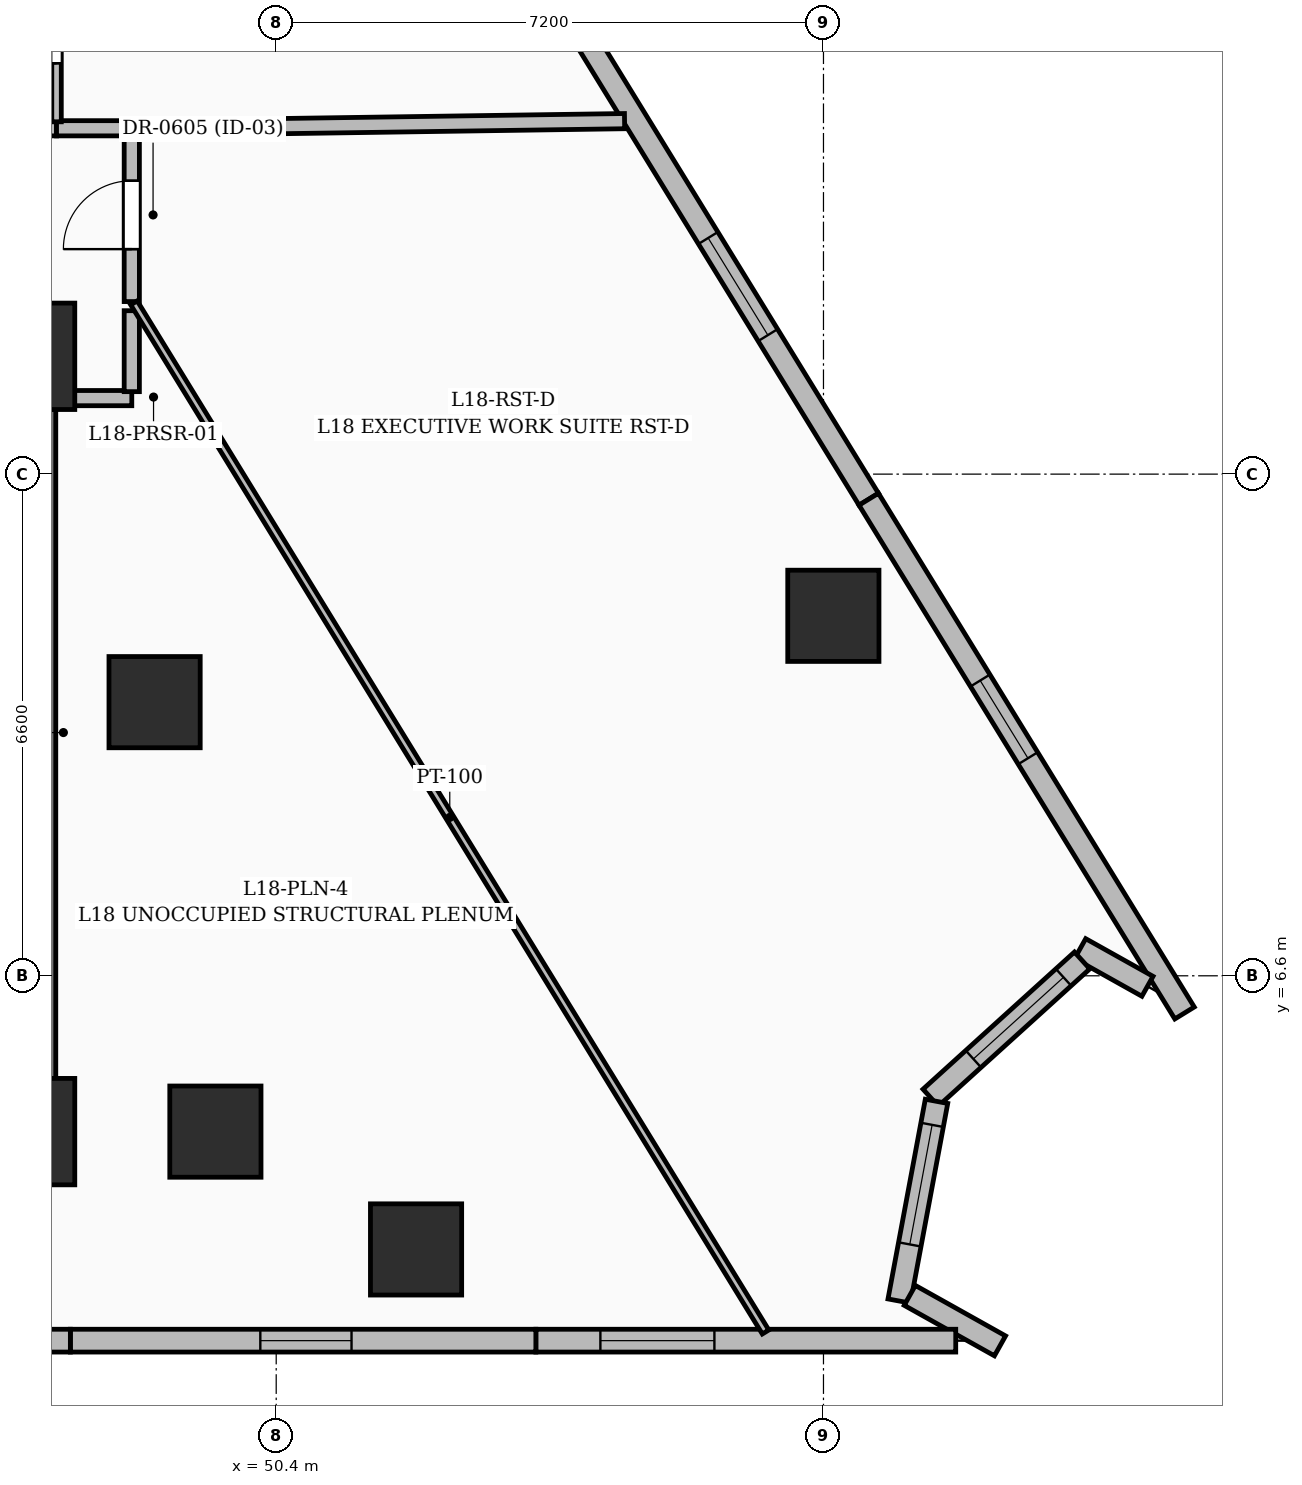
"""IFC4 building model, lengths in metres.
Left out: names, types, materials, properties, quantities, classifications, styles, units other than length and angle.
Written with IfcOpenShell. Run it as: python <this file> out.ifc"""

import sys

from ifc_helpers import new_model, si_unit, direction, frame, frame_2d, origin, origin_2d, place, context, subcontext, project, spatial, rectangle, extrude, element, fill, save


model = new_model("IFC4")
c1 = context("Model", 3, precision=1e-05, world=origin(), true_north=direction((0.0, 1.0)))
c2 = subcontext(c1, "Body", "Model", "MODEL_VIEW")
j1 = project(units=[si_unit("LENGTHUNIT", "METRE"), si_unit("PLANEANGLEUNIT", "RADIAN")], contexts=[c1])
p1 = place(None, origin())
s1 = spatial("IfcSite", under=j1, at=p1, CompositionType="ELEMENT")
p2 = place(p1, origin())
s2 = spatial("IfcBuilding", under=s1, at=p2, CompositionType="ELEMENT")
p3 = place(p2, frame((0.0, 0.0, 75.0)))
s3 = spatial("IfcBuildingStorey", under=s2, at=p3, CompositionType="ELEMENT", Elevation=75.0)
for number, where, z_axis, x_axis in (
    (1, (47.05, 4.55, 0.0), (0.0, 0.0, 1.0), (1.0, 0.0, 0.0)),
    (2, (47.05, 14.75, 0.0), (0.0, 0.0, 1.0), (1.0, 0.0, 0.0)),
):
    element("IfcColumn", number, at=place(p3, frame(where, z_axis=z_axis, x_axis=x_axis)), inside=s3, PredefinedType="COLUMN", context=c2, shape_type="SweptSolid", body=[
        extrude(rectangle(XDim=1.4, YDim=1.4, at=origin_2d()), origin(), (0.0, 0.0, 1.0), 3.6),
    ])
for number, where, z_axis, x_axis in (
    (3, (49.6, 4.55, 0.0), (0.0, 0.0, 1.0), (1.0, 0.0, 0.0)),
    (4, (48.8, 10.2, 0.0), (0.0, 0.0, 1.0), (1.0, 0.0, 0.0)),
):
    element("IfcColumn", number, at=place(p3, frame(where, z_axis=z_axis, x_axis=x_axis)), inside=s3, PredefinedType="COLUMN", context=c2, shape_type="SweptSolid", body=[
        extrude(rectangle(XDim=1.2, YDim=1.2, at=origin_2d()), origin(), (0.0, 0.0, 1.0), 3.6),
    ])
p4 = place(p3, frame((47.05, 5.25, 0.0), z_axis=(0.0, 0.0, 1.0), x_axis=(0.0, 1.0, 0.0)))
e5 = element("IfcWall", 5, at=p4, inside=s3, PredefinedType="SHEAR", context=c2, shape_type="SweptSolid", body=[
    extrude(rectangle(XDim=8.8, YDim=0.9, at=frame_2d((4.4, 0.0))), origin(), (0.0, 0.0, 1.0), 3.6),
])
for number, where, z_axis, x_axis in (
    (6, (52.24, 3.0, 0.0), (0.0, 0.0, 1.0), (1.0, 0.0, 0.0)),
    (7, (57.73, 11.336, 0.0), (0.0, 0.0, 1.0), (1.0, 0.0, 0.0)),
):
    element("IfcColumn", number, at=place(p3, frame(where, z_axis=z_axis, x_axis=x_axis)), inside=s3, PredefinedType="COLUMN", context=c2, shape_type="SweptSolid", body=[
        extrude(rectangle(XDim=1.2, YDim=1.2, at=origin_2d()), origin(), (0.0, 0.0, 1.0), 3.6),
    ])
p5 = place(p3, frame((54.041, 19.629, 0.0), z_axis=(0.0, 0.0, 1.0), x_axis=(0.523661280051, -0.851926560083, 0.0)))
e8 = element("IfcWall", 8, at=p5, inside=s3, PredefinedType="SOLIDWALL", context=c2, shape_type="SweptSolid", body=[
    extrude(rectangle(XDim=7.934, YDim=0.3, at=frame_2d((3.967, 0.0))), origin(), (0.0, 0.0, 1.0), 3.35),
])
p6 = place(p5, frame((3.9, 0.0, 0.6)))
e9 = element("IfcOpeningElement", 9, at=p6, cuts=e8, PredefinedType="OPENING", context=c2, shape_type="SweptSolid", body=[
    extrude(rectangle(XDim=1.5, YDim=2.1, at=frame_2d((0.75, 1.05))), frame((0.0, 0.16, 0.0), z_axis=(0.0, -1.0, 0.0), x_axis=(1.0, 0.0, 0.0)), (0.0, 0.0, 1.0), 0.32),
])
p7 = place(p3, frame((58.195, 12.87, 0.0), z_axis=(0.0, 0.0, 1.0), x_axis=(0.52368361247, -0.851912832413, 0.0)))
e10 = element("IfcWall", 10, at=p7, inside=s3, PredefinedType="SOLIDWALL", context=c2, shape_type="SweptSolid", body=[
    extrude(rectangle(XDim=7.934, YDim=0.3, at=frame_2d((3.967, 0.0))), origin(), (0.0, 0.0, 1.0), 3.35),
])
p8 = place(p7, frame((2.8, 0.0, 0.8)))
e11 = element("IfcOpeningElement", 11, at=p8, cuts=e10, PredefinedType="OPENING", context=c2, shape_type="SweptSolid", body=[
    extrude(rectangle(XDim=1.2, YDim=1.8, at=frame_2d((0.6, 0.9))), frame((0.0, 0.16, 0.0), z_axis=(0.0, -1.0, 0.0), x_axis=(1.0, 0.0, 0.0)), (0.0, 0.0, 1.0), 0.32),
])
p9 = place(p3, frame((61.863, 6.462, 0.0), z_axis=(0.0, 0.0, 1.0), x_axis=(-0.872678236231, 0.488295705499, 0.0)))
e12 = element("IfcWall", 12, at=p9, inside=s3, PredefinedType="SOLIDWALL", context=c2, shape_type="SweptSolid", body=[
    extrude(rectangle(XDim=1.015, YDim=0.3, at=frame_2d((0.507, 0.0))), origin(), (0.0, 0.0, 1.0), 3.35),
])
p10 = place(p3, frame((61.003, 6.802, 0.0), z_axis=(0.0, 0.0, 1.0), x_axis=(-0.741163448221, -0.671324618215, 0.0)))
e13 = element("IfcWall", 13, at=p10, inside=s3, PredefinedType="SOLIDWALL", context=c2, shape_type="SweptSolid", body=[
    extrude(rectangle(XDim=2.688, YDim=0.3, at=frame_2d((1.344, 0.0))), origin(), (0.0, 0.0, 1.0), 3.35),
])
p11 = place(p10, frame((0.33, 0.0, 0.55)))
e14 = element("IfcOpeningElement", 14, at=p11, cuts=e13, PredefinedType="OPENING", context=c2, shape_type="SweptSolid", body=[
    extrude(rectangle(XDim=1.6, YDim=2.2, at=frame_2d((0.8, 1.1))), frame((0.0, 0.16, 0.0), z_axis=(0.0, -1.0, 0.0), x_axis=(1.0, 0.0, 0.0)), (0.0, 0.0, 1.0), 0.32),
])
p12 = place(p3, frame((59.087, 4.948, 0.0), z_axis=(0.0, 0.0, 1.0), x_axis=(-0.183786629236, -0.982966161632, 0.0)))
e15 = element("IfcWall", 15, at=p12, inside=s3, PredefinedType="SOLIDWALL", context=c2, shape_type="SweptSolid", body=[
    extrude(rectangle(XDim=2.673, YDim=0.3, at=frame_2d((1.336, 0.0))), origin(), (0.0, 0.0, 1.0), 3.35),
])
p13 = place(p12, frame((0.315, 0.0, 0.55)))
e16 = element("IfcOpeningElement", 16, at=p13, cuts=e15, PredefinedType="OPENING", context=c2, shape_type="SweptSolid", body=[
    extrude(rectangle(XDim=1.6, YDim=2.2, at=frame_2d((0.8, 1.1))), frame((0.0, 0.16, 0.0), z_axis=(0.0, -1.0, 0.0), x_axis=(1.0, 0.0, 0.0)), (0.0, 0.0, 1.0), 0.32),
])
p14 = place(p3, frame((58.735, 2.396, 0.0), z_axis=(0.0, 0.0, 1.0), x_axis=(0.872747775204, -0.488171405221, 0.0)))
e17 = element("IfcWall", 17, at=p14, inside=s3, PredefinedType="SOLIDWALL", context=c2, shape_type="SweptSolid", body=[
    extrude(rectangle(XDim=1.36, YDim=0.3, at=frame_2d((0.68, 0.0))), origin(), (0.0, 0.0, 1.0), 3.35),
])
p15 = place(p3, frame((59.34, 1.8, 0.0), z_axis=(0.0, 0.0, 1.0), x_axis=(-1.0, 0.0, 0.0)))
e18 = element("IfcWall", 18, at=p15, inside=s3, PredefinedType="SOLIDWALL", context=c2, shape_type="SweptSolid", body=[
    extrude(rectangle(XDim=5.524, YDim=0.3, at=frame_2d((2.762, 0.0))), origin(), (0.0, 0.0, 1.0), 3.35),
])
p16 = place(p15, frame((3.175, 0.0, 0.6)))
e19 = element("IfcOpeningElement", 19, at=p16, cuts=e18, PredefinedType="OPENING", context=c2, shape_type="SweptSolid", body=[
    extrude(rectangle(XDim=1.5, YDim=2.1, at=frame_2d((0.75, 1.05))), frame((0.0, 0.16, 0.0), z_axis=(0.0, -1.0, 0.0), x_axis=(1.0, 0.0, 0.0)), (0.0, 0.0, 1.0), 0.32),
])
p17 = place(p3, frame((53.816, 1.8, 0.0), z_axis=(0.0, 0.0, 1.0), x_axis=(-1.0, 0.0, 0.0)))
e20 = element("IfcWall", 20, at=p17, inside=s3, PredefinedType="SOLIDWALL", context=c2, shape_type="SweptSolid", body=[
    extrude(rectangle(XDim=6.124, YDim=0.3, at=frame_2d((3.062, 0.0))), origin(), (0.0, 0.0, 1.0), 3.35),
])
p18 = place(p17, frame((2.425, 0.0, 0.8)))
e21 = element("IfcOpeningElement", 21, at=p18, cuts=e20, PredefinedType="OPENING", context=c2, shape_type="SweptSolid", body=[
    extrude(rectangle(XDim=1.2, YDim=1.8, at=frame_2d((0.6, 0.9))), frame((0.0, 0.16, 0.0), z_axis=(0.0, -1.0, 0.0), x_axis=(1.0, 0.0, 0.0)), (0.0, 0.0, 1.0), 0.32),
])
p19 = place(p3, frame((47.692, 1.8, 0.0), z_axis=(0.0, 0.0, 1.0), x_axis=(-1.0, 0.0, 0.0)))
e22 = element("IfcWall", 22, at=p19, inside=s3, PredefinedType="SOLIDWALL", context=c2, shape_type="SweptSolid", body=[
    extrude(rectangle(XDim=6.124, YDim=0.3, at=frame_2d((3.062, 0.0))), origin(), (0.0, 0.0, 1.0), 3.35),
])
p20 = place(p19, frame((1.825, 0.0, 0.6)))
e23 = element("IfcOpeningElement", 23, at=p20, cuts=e22, PredefinedType="OPENING", context=c2, shape_type="SweptSolid", body=[
    extrude(rectangle(XDim=2.4, YDim=2.1, at=frame_2d((1.2, 1.05))), frame((0.0, 0.16, 0.0), z_axis=(0.0, -1.0, 0.0), x_axis=(1.0, 0.0, 0.0)), (0.0, 0.0, 1.0), 0.32),
])
p21 = place(p3, frame((47.5, 14.2, 0.0), z_axis=(0.0, 0.0, 1.0), x_axis=(1.0, 0.0, 0.0)))
e24 = element("IfcWall", 24, at=p21, inside=s3, PredefinedType="PARTITIONING", context=c2, shape_type="SweptSolid", body=[
    extrude(rectangle(XDim=1.0, YDim=0.2, at=frame_2d((0.5, 0.0))), origin(), (0.0, 0.0, 1.0), 3.35),
])
p22 = place(p3, frame((48.5, 14.285, 0.0), z_axis=(0.0, 0.0, 1.0), x_axis=(0.0, 1.0, 0.0)))
e25 = element("IfcWall", 25, at=p22, inside=s3, PredefinedType="PARTITIONING", context=c2, shape_type="SweptSolid", body=[
    extrude(rectangle(XDim=1.065, YDim=0.2, at=frame_2d((0.533, 0.0))), origin(), (0.0, 0.0, 1.0), 3.35),
])
p23 = place(p3, frame((48.5, 15.47, 0.0), z_axis=(0.0, 0.0, 1.0), x_axis=(0.0, 1.0, 0.0)))
e26 = element("IfcWall", 26, at=p23, inside=s3, PredefinedType="PARTITIONING", context=c2, shape_type="SweptSolid", body=[
    extrude(rectangle(XDim=2.28, YDim=0.2, at=frame_2d((1.14, 0.0))), origin(), (0.0, 0.0, 1.0), 2.345),
])
p24 = place(p23, frame((0.69, 0.0, 0.0)))
e27 = element("IfcOpeningElement", 27, at=p24, cuts=e26, PredefinedType="OPENING", context=c2, shape_type="SweptSolid", body=[
    extrude(rectangle(XDim=0.9, YDim=2.1, at=frame_2d((0.45, 1.05))), frame((0.0, 0.11, 0.0), z_axis=(0.0, -1.0, 0.0), x_axis=(1.0, 0.0, 0.0)), (0.0, 0.0, 1.0), 0.22),
])
p25 = place(p3, frame((47.51, 17.75, 0.0), z_axis=(0.0, 0.0, 1.0), x_axis=(-1.0, 0.0, 0.0)))
e28 = element("IfcWall", 28, at=p25, inside=s3, PredefinedType="PARTITIONING", context=c2, shape_type="SweptSolid", body=[
    extrude(rectangle(XDim=5.57, YDim=0.2, at=frame_2d((2.785, 0.0))), origin(), (0.0, 0.0, 1.0), 2.309),
])
p26 = place(p25, frame((3.0, 0.0, 0.0)))
e29 = element("IfcOpeningElement", 29, at=p26, cuts=e28, PredefinedType="OPENING", context=c2, shape_type="SweptSolid", body=[
    extrude(rectangle(XDim=1.0, YDim=2.2, at=frame_2d((0.5, 1.1))), frame((0.0, 0.11, 0.0), z_axis=(0.0, -1.0, 0.0), x_axis=(1.0, 0.0, 0.0)), (0.0, 0.0, 1.0), 0.22),
])
p27 = place(p3, frame((48.415, 17.75, 0.0), z_axis=(0.0, 0.0, 1.0), x_axis=(-1.0, 0.0, 0.0)))
e30 = element("IfcWall", 30, at=p27, inside=s3, PredefinedType="PARTITIONING", context=c2, shape_type="SweptSolid", body=[
    extrude(rectangle(XDim=0.905, YDim=0.2, at=frame_2d((0.453, 0.0))), origin(), (0.0, 0.0, 1.0), 2.911),
])
p28 = place(p3, frame((48.529, 15.453, 0.0), z_axis=(0.0, 0.0, 1.0), x_axis=(0.52306290803, -0.852294077325, 0.0)))
e31 = element("IfcWall", 31, at=p28, inside=s3, PredefinedType="PARTITIONING", context=c2, shape_type="SweptSolid", body=[
    extrude(rectangle(XDim=15.885, YDim=0.1, at=frame_2d((7.943, 0.0))), origin(), (0.0, 0.0, 1.0), 2.345),
])
p29 = place(p3, frame((54.983, 17.844, 0.0), z_axis=(0.0, 0.0, 1.0), x_axis=(-0.999894330503, -0.014537118977, 0.0)))
e32 = element("IfcWall", 32, at=p29, inside=s3, PredefinedType="PARTITIONING", context=c2, shape_type="SweptSolid", body=[
    extrude(rectangle(XDim=6.399, YDim=0.2, at=frame_2d((3.199, 0.0))), origin(), (0.0, 0.0, 1.0), 2.345),
])
p30 = place(p3, frame((47.51, 17.835, 0.0), z_axis=(0.0, 0.0, 1.0), x_axis=(0.0, 1.0, 0.0)))
e33 = element("IfcWall", 33, at=p30, inside=s3, PredefinedType="PARTITIONING", context=c2, shape_type="SweptSolid", body=[
    extrude(rectangle(XDim=2.695, YDim=0.125, at=frame_2d((1.348, 0.0))), origin(), (0.0, 0.0, 1.0), 2.911),
])
p31 = place(p30, frame((0.771, 0.0, 0.0)))
e34 = element("IfcOpeningElement", 34, at=p31, cuts=e33, PredefinedType="OPENING", context=c2, shape_type="SweptSolid", body=[
    extrude(rectangle(XDim=0.95, YDim=2.2, at=frame_2d((0.475, 1.1))), frame((0.0, 0.072, 0.0), z_axis=(0.0, -1.0, 0.0), x_axis=(1.0, 0.0, 0.0)), (0.0, 0.0, 1.0), 0.145),
])
p32 = place(p6, origin())
e35 = element("IfcWindow", 35, at=p32, inside=s3, PartitioningType="SINGLE_PANEL", PredefinedType="WINDOW", context=c2, shape_type="SweptSolid", body=[
    extrude(rectangle(XDim=1.5, YDim=2.1, at=frame_2d((0.75, 1.05))), frame((0.0, 0.03, 0.0), z_axis=(0.0, -1.0, 0.0), x_axis=(1.0, 0.0, 0.0)), (0.0, 0.0, 1.0), 0.06),
])
fill(e9, e35)
p33 = place(p8, origin())
e36 = element("IfcWindow", 36, at=p33, inside=s3, PartitioningType="SINGLE_PANEL", PredefinedType="WINDOW", context=c2, shape_type="SweptSolid", body=[
    extrude(rectangle(XDim=1.2, YDim=1.8, at=frame_2d((0.6, 0.9))), frame((0.0, 0.03, 0.0), z_axis=(0.0, -1.0, 0.0), x_axis=(1.0, 0.0, 0.0)), (0.0, 0.0, 1.0), 0.06),
])
fill(e11, e36)
p34 = place(p11, origin())
e37 = element("IfcWindow", 37, at=p34, inside=s3, PartitioningType="SINGLE_PANEL", PredefinedType="WINDOW", context=c2, shape_type="SweptSolid", body=[
    extrude(rectangle(XDim=1.6, YDim=2.2, at=frame_2d((0.8, 1.1))), frame((0.0, 0.03, 0.0), z_axis=(0.0, -1.0, 0.0), x_axis=(1.0, 0.0, 0.0)), (0.0, 0.0, 1.0), 0.06),
])
fill(e14, e37)
p35 = place(p13, origin())
e38 = element("IfcWindow", 38, at=p35, inside=s3, PartitioningType="SINGLE_PANEL", PredefinedType="WINDOW", context=c2, shape_type="SweptSolid", body=[
    extrude(rectangle(XDim=1.6, YDim=2.2, at=frame_2d((0.8, 1.1))), frame((0.0, 0.03, 0.0), z_axis=(0.0, -1.0, 0.0), x_axis=(1.0, 0.0, 0.0)), (0.0, 0.0, 1.0), 0.06),
])
fill(e16, e38)
p36 = place(p16, origin())
e39 = element("IfcWindow", 39, at=p36, inside=s3, PartitioningType="SINGLE_PANEL", PredefinedType="WINDOW", context=c2, shape_type="SweptSolid", body=[
    extrude(rectangle(XDim=1.5, YDim=2.1, at=frame_2d((0.75, 1.05))), frame((0.0, 0.03, 0.0), z_axis=(0.0, -1.0, 0.0), x_axis=(1.0, 0.0, 0.0)), (0.0, 0.0, 1.0), 0.06),
])
fill(e19, e39)
p37 = place(p18, origin())
e40 = element("IfcWindow", 40, at=p37, inside=s3, PartitioningType="SINGLE_PANEL", PredefinedType="WINDOW", context=c2, shape_type="SweptSolid", body=[
    extrude(rectangle(XDim=1.2, YDim=1.8, at=frame_2d((0.6, 0.9))), frame((0.0, 0.03, 0.0), z_axis=(0.0, -1.0, 0.0), x_axis=(1.0, 0.0, 0.0)), (0.0, 0.0, 1.0), 0.06),
])
fill(e21, e40)
p38 = place(p24, origin())
e41 = element("IfcDoor", 41, at=p38, inside=s3, OperationType="SINGLE_SWING_LEFT", PredefinedType="DOOR", context=c2, shape_type="SweptSolid", body=[
    extrude(rectangle(XDim=0.9, YDim=2.1, at=frame_2d((0.45, 1.05))), frame((0.0, 0.025, 0.0), z_axis=(0.0, -1.0, 0.0), x_axis=(1.0, 0.0, 0.0)), (0.0, 0.0, 1.0), 0.05),
])
fill(e27, e41)
p39 = place(p31, origin())
e42 = element("IfcDoor", 42, at=p39, inside=s3, OperationType="SINGLE_SWING_LEFT", PredefinedType="DOOR", context=c2, shape_type="SweptSolid", body=[
    extrude(rectangle(XDim=0.95, YDim=2.2, at=frame_2d((0.475, 1.1))), frame((0.0, 0.025, 0.0), z_axis=(0.0, -1.0, 0.0), x_axis=(1.0, 0.0, 0.0)), (0.0, 0.0, 1.0), 0.05),
])
fill(e34, e42)
save(model, sys.argv[1])
